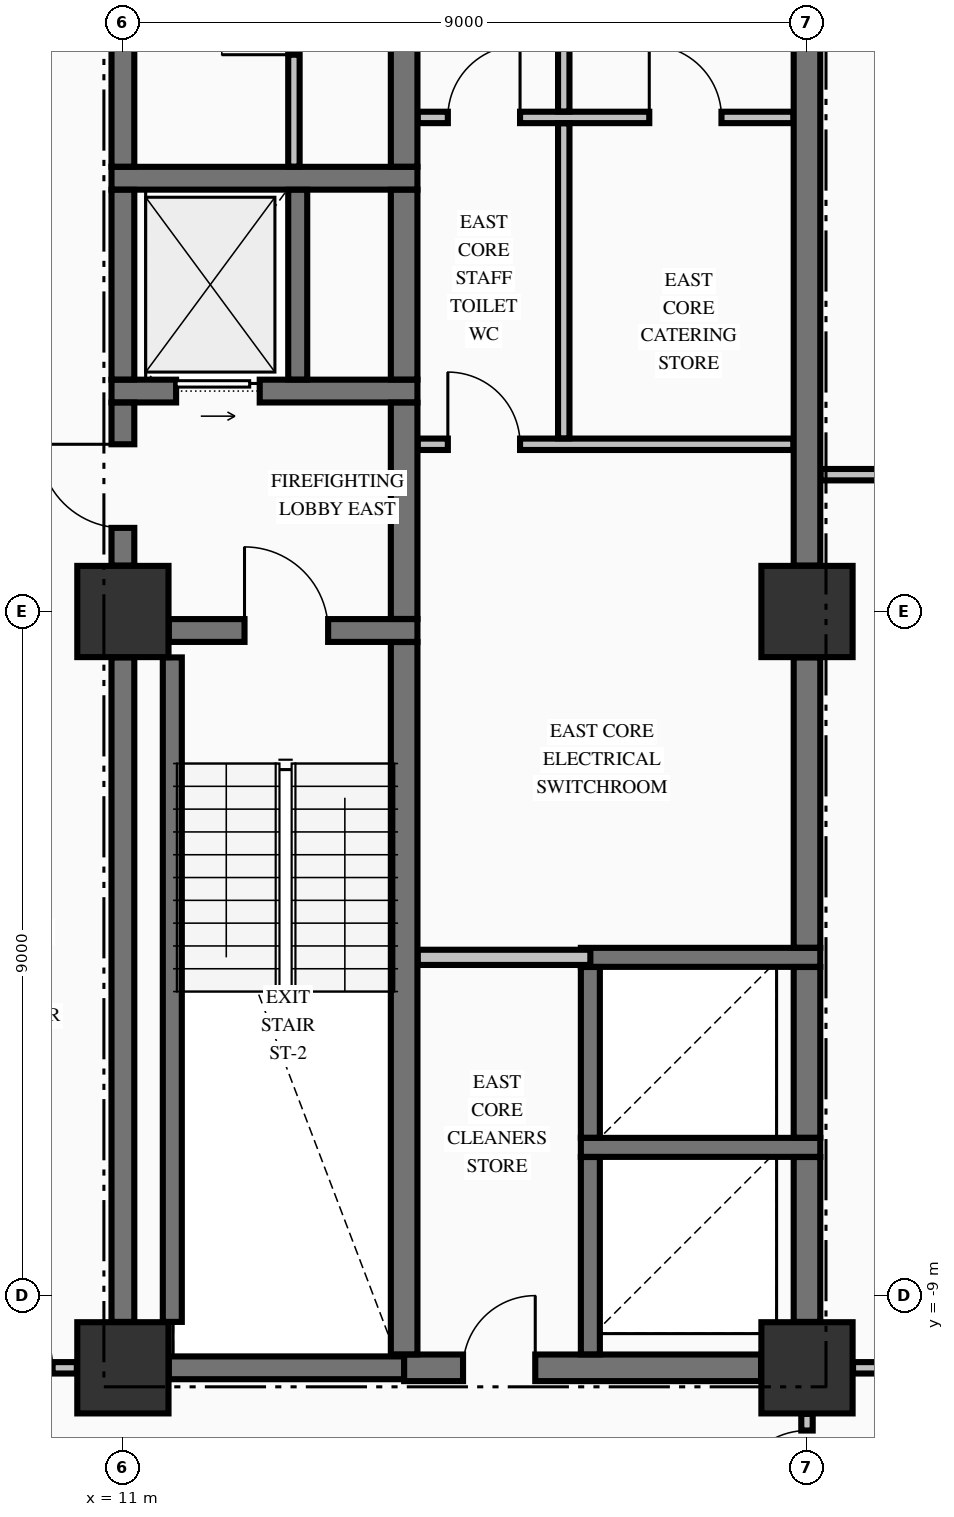
"""IFC4 building model, lengths in metres.
Left out: names, types, materials, properties, quantities, classifications, styles, units other than length and angle.
Written with IfcOpenShell. Run it as: python <this file> out.ifc"""

import sys

from ifc_helpers import new_model, si_unit, direction, frame, frame_2d, origin, origin_2d, place, context, subcontext, project, spatial, rectangle, extrude, element, fill, save


model = new_model("IFC4")
c1 = context("Model", 3, precision=1e-05, world=origin(), true_north=direction((0.0, 1.0)))
c2 = subcontext(c1, "Body", "Model", "MODEL_VIEW")
j1 = project(units=[si_unit("LENGTHUNIT", "METRE"), si_unit("PLANEANGLEUNIT", "RADIAN")], contexts=[c1])
p1 = place(None, origin())
s1 = spatial("IfcSite", under=j1, at=p1, CompositionType="ELEMENT")
p2 = place(p1, origin())
s2 = spatial("IfcBuilding", under=s1, at=p2, CompositionType="ELEMENT")
p3 = place(p2, frame((0.0, 0.0, 37.91)))
s3 = spatial("IfcBuildingStorey", under=s2, at=p3, CompositionType="ELEMENT", Elevation=37.91)
for number, where, z_axis, x_axis in (
    (1, (11.0, -9.95, -0.25), (0.0, 0.0, 1.0), (1.0, 0.0, 0.0)),
    (2, (11.0, 0.0, -0.25), (0.0, 0.0, 1.0), (1.0, 0.0, 0.0)),
    (3, (20.0, -9.95, -0.25), (0.0, 0.0, 1.0), (1.0, 0.0, 0.0)),
    (4, (20.0, 0.0, -0.25), (0.0, 0.0, 1.0), (1.0, 0.0, 0.0)),
):
    element("IfcColumn", number, at=place(p3, frame(where, z_axis=z_axis, x_axis=x_axis)), inside=s3, PredefinedType="COLUMN", context=c2, shape_type="SweptSolid", body=[
        extrude(rectangle(XDim=1.2, YDim=1.2, at=origin_2d()), origin(), (0.0, 0.0, 1.0), 3.57),
    ])
p4 = place(p3, frame((11.604, -9.95, 0.0), z_axis=(0.0, 0.0, 1.0), x_axis=(1.0, 0.0, 0.0)))
e5 = element("IfcWall", 5, at=p4, inside=s3, PredefinedType="SHEAR", context=c2, shape_type="SweptSolid", body=[
    extrude(rectangle(XDim=3.096, YDim=0.3, at=frame_2d((1.548, 0.0))), origin(), (0.0, 0.0, 1.0), 3.32),
])
p5 = place(p3, frame((14.7, -9.95, 0.0), z_axis=(0.0, 0.0, 1.0), x_axis=(1.0, 0.0, 0.0)))
e6 = element("IfcWall", 6, at=p5, inside=s3, PredefinedType="SHEAR", context=c2, shape_type="SweptSolid", body=[
    extrude(rectangle(XDim=4.696, YDim=0.35, at=frame_2d((2.348, 0.0))), origin(), (0.0, 0.0, 1.0), 3.32),
])
p6 = place(p5, frame((0.775, 0.0, 0.0)))
e7 = element("IfcOpeningElement", 7, at=p6, cuts=e6, PredefinedType="OPENING", context=c2, shape_type="SweptSolid", body=[
    extrude(rectangle(XDim=0.95, YDim=2.15, at=frame_2d((0.475, 1.075))), frame((0.0, 0.185, 0.0), z_axis=(0.0, -1.0, 0.0), x_axis=(1.0, 0.0, 0.0)), (0.0, 0.0, 1.0), 0.37),
])
for number, where, z_axis, x_axis in (
    (8, (17.025, -7.05, 0.0), (0.0, 0.0, 1.0), (1.0, 0.0, 0.0)),
    (9, (17.025, -4.55, 0.0), (0.0, 0.0, 1.0), (1.0, 0.0, 0.0)),
):
    element("IfcWall", number, at=place(p3, frame(where, z_axis=z_axis, x_axis=x_axis)), inside=s3, PredefinedType="SOLIDWALL", context=c2, shape_type="SweptSolid", body=[
        extrude(rectangle(XDim=3.15, YDim=0.25, at=frame_2d((1.575, 0.0))), origin(), (0.0, 0.0, 1.0), 3.32),
    ])
p7 = place(p3, frame((11.604, -0.25, 0.0), z_axis=(0.0, 0.0, 1.0), x_axis=(1.0, 0.0, 0.0)))
e10 = element("IfcWall", 10, at=p7, inside=s3, PredefinedType="SHEAR", context=c2, shape_type="SweptSolid", body=[
    extrude(rectangle(XDim=3.271, YDim=0.3, at=frame_2d((1.635, 0.0))), origin(), (0.0, 0.0, 1.0), 3.32),
])
p8 = place(p7, frame((0.996, 0.0, 0.0)))
e11 = element("IfcOpeningElement", 11, at=p8, cuts=e10, PredefinedType="OPENING", context=c2, shape_type="SweptSolid", body=[
    extrude(rectangle(XDim=1.1, YDim=2.15, at=frame_2d((0.55, 1.075))), frame((0.0, 0.16, 0.0), z_axis=(0.0, -1.0, 0.0), x_axis=(1.0, 0.0, 0.0)), (0.0, 0.0, 1.0), 0.32),
])
p9 = place(p3, frame((10.85, 2.9, 0.0), z_axis=(0.0, 0.0, 1.0), x_axis=(1.0, 0.0, 0.0)))
e12 = element("IfcWall", 12, at=p9, inside=s3, PredefinedType="SHEAR", context=c2, shape_type="SweptSolid", body=[
    extrude(rectangle(XDim=4.025, YDim=0.3, at=frame_2d((2.012, 0.0))), origin(), (0.0, 0.0, 1.0), 3.32),
])
p10 = place(p9, frame((0.85, 0.0, 0.0)))
e13 = element("IfcOpeningElement", 13, at=p10, cuts=e12, PredefinedType="OPENING", context=c2, shape_type="SweptSolid", body=[
    extrude(rectangle(XDim=1.1, YDim=2.2, at=frame_2d((0.55, 1.1))), frame((0.0, 0.16, 0.0), z_axis=(0.0, -1.0, 0.0), x_axis=(1.0, 0.0, 0.0)), (0.0, 0.0, 1.0), 0.32),
])
p11 = place(p3, frame((10.85, 5.7, 0.0), z_axis=(0.0, 0.0, 1.0), x_axis=(1.0, 0.0, 0.0)))
e14 = element("IfcWall", 14, at=p11, inside=s3, PredefinedType="SHEAR", context=c2, shape_type="SweptSolid", body=[
    extrude(rectangle(XDim=4.025, YDim=0.3, at=frame_2d((2.012, 0.0))), origin(), (0.0, 0.0, 1.0), 3.32),
])
p12 = place(p3, frame((-10.394, -9.95, 0.0), z_axis=(0.0, 0.0, 1.0), x_axis=(1.0, 0.0, 0.0)))
e15 = element("IfcWall", 15, at=p12, inside=s3, PredefinedType="PARTITIONING", context=c2, shape_type="SweptSolid", body=[
    extrude(rectangle(XDim=20.788, YDim=0.15, at=frame_2d((10.394, 0.0))), origin(), (0.0, 0.0, 1.0), 3.32),
])
p13 = place(p12, frame((0.319, 0.0, 0.0)))
e16 = element("IfcOpeningElement", 16, at=p13, cuts=e15, PredefinedType="OPENING", context=c2, shape_type="SweptSolid", body=[
    extrude(rectangle(XDim=1.05, YDim=2.15, at=frame_2d((0.525, 1.075))), frame((0.0, 0.085, 0.0), z_axis=(0.0, -1.0, 0.0), x_axis=(1.0, 0.0, 0.0)), (0.0, 0.0, 1.0), 0.17),
])
p14 = place(p12, frame((19.419, 0.0, 0.0)))
e17 = element("IfcOpeningElement", 17, at=p14, cuts=e15, PredefinedType="OPENING", context=c2, shape_type="SweptSolid", body=[
    extrude(rectangle(XDim=1.05, YDim=2.15, at=frame_2d((0.525, 1.075))), frame((0.0, 0.085, 0.0), z_axis=(0.0, -1.0, 0.0), x_axis=(1.0, 0.0, 0.0)), (0.0, 0.0, 1.0), 0.17),
])
p15 = place(p12, frame((11.569, 0.0, 0.0)))
e18 = element("IfcOpeningElement", 18, at=p15, cuts=e15, PredefinedType="OPENING", context=c2, shape_type="SweptSolid", body=[
    extrude(rectangle(XDim=0.95, YDim=2.15, at=frame_2d((0.475, 1.075))), frame((0.0, 0.085, 0.0), z_axis=(0.0, -1.0, 0.0), x_axis=(1.0, 0.0, 0.0)), (0.0, 0.0, 1.0), 0.17),
])
p16 = place(p3, frame((20.606, -9.95, 0.0), z_axis=(0.0, 0.0, 1.0), x_axis=(1.0, 0.0, 0.0)))
e19 = element("IfcWall", 19, at=p16, inside=s3, PredefinedType="PARTITIONING", context=c2, shape_type="SweptSolid", body=[
    extrude(rectangle(XDim=8.229, YDim=0.15, at=frame_2d((4.115, 0.0))), origin(), (0.0, 0.0, 1.0), 3.32),
])
p17 = place(p16, frame((3.419, 0.0, 0.0)))
e20 = element("IfcOpeningElement", 20, at=p17, cuts=e19, PredefinedType="OPENING", context=c2, shape_type="SweptSolid", body=[
    extrude(rectangle(XDim=0.95, YDim=2.15, at=frame_2d((0.475, 1.075))), frame((0.0, 0.085, 0.0), z_axis=(0.0, -1.0, 0.0), x_axis=(1.0, 0.0, 0.0)), (0.0, 0.0, 1.0), 0.17),
])
p18 = place(p3, frame((14.878, -4.55, 0.0), z_axis=(0.0, 0.0, 1.0), x_axis=(1.0, 0.0, 0.0)))
e21 = element("IfcWall", 21, at=p18, inside=s3, PredefinedType="PARTITIONING", context=c2, shape_type="SweptSolid", body=[
    extrude(rectangle(XDim=2.272, YDim=0.2, at=frame_2d((1.136, 0.0))), origin(), (0.0, 0.0, 1.0), 3.32),
])
p19 = place(p3, frame((20.178, 1.8, 0.0), z_axis=(0.0, 0.0, 1.0), x_axis=(1.0, 0.0, 0.0)))
e22 = element("IfcWall", 22, at=p19, inside=s3, PredefinedType="PARTITIONING", context=c2, shape_type="SweptSolid", body=[
    extrude(rectangle(XDim=8.657, YDim=0.15, at=frame_2d((4.329, 0.0))), origin(), (0.0, 0.0, 1.0), 3.32),
])
p20 = place(p3, frame((14.878, 2.2, 0.0), z_axis=(0.0, 0.0, 1.0), x_axis=(1.0, 0.0, 0.0)))
e23 = element("IfcWall", 23, at=p20, inside=s3, PredefinedType="PARTITIONING", context=c2, shape_type="SweptSolid", body=[
    extrude(rectangle(XDim=4.944, YDim=0.15, at=frame_2d((2.472, 0.0))), origin(), (0.0, 0.0, 1.0), 3.32),
])
p21 = place(p20, frame((0.397, 0.0, 0.0)))
e24 = element("IfcOpeningElement", 24, at=p21, cuts=e23, PredefinedType="OPENING", context=c2, shape_type="SweptSolid", body=[
    extrude(rectangle(XDim=0.95, YDim=2.15, at=frame_2d((0.475, 1.075))), frame((0.0, 0.085, 0.0), z_axis=(0.0, -1.0, 0.0), x_axis=(1.0, 0.0, 0.0)), (0.0, 0.0, 1.0), 0.17),
])
p22 = place(p3, frame((14.878, 6.5, 0.0), z_axis=(0.0, 0.0, 1.0), x_axis=(1.0, 0.0, 0.0)))
e25 = element("IfcWall", 25, at=p22, inside=s3, PredefinedType="PARTITIONING", context=c2, shape_type="SweptSolid", body=[
    extrude(rectangle(XDim=4.944, YDim=0.15, at=frame_2d((2.472, 0.0))), origin(), (0.0, 0.0, 1.0), 3.32),
])
p23 = place(p22, frame((0.397, 0.0, 0.0)))
e26 = element("IfcOpeningElement", 26, at=p23, cuts=e25, PredefinedType="OPENING", context=c2, shape_type="SweptSolid", body=[
    extrude(rectangle(XDim=0.95, YDim=2.15, at=frame_2d((0.475, 1.075))), frame((0.0, 0.085, 0.0), z_axis=(0.0, -1.0, 0.0), x_axis=(1.0, 0.0, 0.0)), (0.0, 0.0, 1.0), 0.17),
])
p24 = place(p22, frame((3.047, 0.0, 0.0)))
e27 = element("IfcOpeningElement", 27, at=p24, cuts=e25, PredefinedType="OPENING", context=c2, shape_type="SweptSolid", body=[
    extrude(rectangle(XDim=0.95, YDim=2.15, at=frame_2d((0.475, 1.075))), frame((0.0, 0.085, 0.0), z_axis=(0.0, -1.0, 0.0), x_axis=(1.0, 0.0, 0.0)), (0.0, 0.0, 1.0), 0.17),
])
p25 = place(p3, frame((11.0, -9.346, 0.0), z_axis=(0.0, 0.0, 1.0), x_axis=(0.0, 1.0, 0.0)))
e28 = element("IfcWall", 28, at=p25, inside=s3, PredefinedType="SHEAR", context=c2, shape_type="SweptSolid", body=[
    extrude(rectangle(XDim=8.742, YDim=0.3, at=frame_2d((4.371, 0.0))), origin(), (0.0, 0.0, 1.0), 3.32),
])
p26 = place(p3, frame((11.0, 0.604, 0.0), z_axis=(0.0, 0.0, 1.0), x_axis=(0.0, 1.0, 0.0)))
e29 = element("IfcWall", 29, at=p26, inside=s3, PredefinedType="SHEAR", context=c2, shape_type="SweptSolid", body=[
    extrude(rectangle(XDim=2.144, YDim=0.3, at=frame_2d((1.072, 0.0))), origin(), (0.0, 0.0, 1.0), 3.32),
])
p27 = place(p26, frame((0.496, 0.0, 0.0)))
e30 = element("IfcOpeningElement", 30, at=p27, cuts=e29, PredefinedType="OPENING", context=c2, shape_type="SweptSolid", body=[
    extrude(rectangle(XDim=1.1, YDim=2.15, at=frame_2d((0.55, 1.075))), frame((0.0, 0.16, 0.0), z_axis=(0.0, -1.0, 0.0), x_axis=(1.0, 0.0, 0.0)), (0.0, 0.0, 1.0), 0.32),
])
p28 = place(p3, frame((11.0, 3.052, 0.0), z_axis=(0.0, 0.0, 1.0), x_axis=(0.0, 1.0, 0.0)))
e31 = element("IfcWall", 31, at=p28, inside=s3, PredefinedType="SHEAR", context=c2, shape_type="SweptSolid", body=[
    extrude(rectangle(XDim=2.496, YDim=0.3, at=frame_2d((1.248, 0.0))), origin(), (0.0, 0.0, 1.0), 3.32),
])
p29 = place(p3, frame((11.0, 5.852, 0.0), z_axis=(0.0, 0.0, 1.0), x_axis=(0.0, 1.0, 0.0)))
e32 = element("IfcWall", 32, at=p29, inside=s3, PredefinedType="SHEAR", context=c2, shape_type="SweptSolid", body=[
    extrude(rectangle(XDim=4.044, YDim=0.3, at=frame_2d((2.022, 0.0))), origin(), (0.0, 0.0, 1.0), 3.32),
])
p30 = place(p3, frame((11.65, -9.346, 0.0), z_axis=(0.0, 0.0, 1.0), x_axis=(0.0, 1.0, 0.0)))
e33 = element("IfcWall", 33, at=p30, inside=s3, PredefinedType="SOLIDWALL", context=c2, shape_type="SweptSolid", body=[
    extrude(rectangle(XDim=8.742, YDim=0.25, at=frame_2d((4.371, 0.0))), origin(), (0.0, 0.0, 1.0), 3.32),
])
p31 = place(p3, frame((13.3, 3.052, 0.0), z_axis=(0.0, 0.0, 1.0), x_axis=(0.0, 1.0, 0.0)))
e34 = element("IfcWall", 34, at=p31, inside=s3, PredefinedType="SOLIDWALL", context=c2, shape_type="SweptSolid", body=[
    extrude(rectangle(XDim=2.496, YDim=0.25, at=frame_2d((1.248, 0.0))), origin(), (0.0, 0.0, 1.0), 3.32),
])
p32 = place(p3, frame((14.7, -9.773, 0.0), z_axis=(0.0, 0.0, 1.0), x_axis=(0.0, 1.0, 0.0)))
e35 = element("IfcWall", 35, at=p32, inside=s3, PredefinedType="SHEAR", context=c2, shape_type="SweptSolid", body=[
    extrude(rectangle(XDim=9.371, YDim=0.35, at=frame_2d((4.686, 0.0))), origin(), (0.0, 0.0, 1.0), 3.32),
])
p33 = place(p3, frame((14.7, -0.098, 0.0), z_axis=(0.0, 0.0, 1.0), x_axis=(0.0, 1.0, 0.0)))
e36 = element("IfcWall", 36, at=p33, inside=s3, PredefinedType="SHEAR", context=c2, shape_type="SweptSolid", body=[
    extrude(rectangle(XDim=2.846, YDim=0.35, at=frame_2d((1.423, 0.0))), origin(), (0.0, 0.0, 1.0), 3.32),
])
p34 = place(p3, frame((14.7, 3.052, 0.0), z_axis=(0.0, 0.0, 1.0), x_axis=(0.0, 1.0, 0.0)))
e37 = element("IfcWall", 37, at=p34, inside=s3, PredefinedType="SHEAR", context=c2, shape_type="SweptSolid", body=[
    extrude(rectangle(XDim=2.496, YDim=0.35, at=frame_2d((1.248, 0.0))), origin(), (0.0, 0.0, 1.0), 3.32),
])
p35 = place(p3, frame((14.7, 5.852, 0.0), z_axis=(0.0, 0.0, 1.0), x_axis=(0.0, 1.0, 0.0)))
e38 = element("IfcWall", 38, at=p35, inside=s3, PredefinedType="SHEAR", context=c2, shape_type="SweptSolid", body=[
    extrude(rectangle(XDim=4.471, YDim=0.35, at=frame_2d((2.235, 0.0))), origin(), (0.0, 0.0, 1.0), 3.32),
])
p36 = place(p3, frame((17.15, -9.773, 0.0), z_axis=(0.0, 0.0, 1.0), x_axis=(0.0, 1.0, 0.0)))
e39 = element("IfcWall", 39, at=p36, inside=s3, PredefinedType="SOLIDWALL", context=c2, shape_type="SweptSolid", body=[
    extrude(rectangle(XDim=2.596, YDim=0.25, at=frame_2d((1.298, 0.0))), origin(), (0.0, 0.0, 1.0), 3.32),
])
p37 = place(p3, frame((17.15, -6.923, 0.0), z_axis=(0.0, 0.0, 1.0), x_axis=(0.0, 1.0, 0.0)))
e40 = element("IfcWall", 40, at=p37, inside=s3, PredefinedType="SOLIDWALL", context=c2, shape_type="SweptSolid", body=[
    extrude(rectangle(XDim=2.246, YDim=0.25, at=frame_2d((1.123, 0.0))), origin(), (0.0, 0.0, 1.0), 3.32),
])
p38 = place(p3, frame((20.0, -9.346, 0.0), z_axis=(0.0, 0.0, 1.0), x_axis=(0.0, 1.0, 0.0)))
e41 = element("IfcWall", 41, at=p38, inside=s3, PredefinedType="SHEAR", context=c2, shape_type="SweptSolid", body=[
    extrude(rectangle(XDim=2.169, YDim=0.35, at=frame_2d((1.084, 0.0))), origin(), (0.0, 0.0, 1.0), 3.32),
])
p39 = place(p3, frame((20.0, -6.923, 0.0), z_axis=(0.0, 0.0, 1.0), x_axis=(0.0, 1.0, 0.0)))
e42 = element("IfcWall", 42, at=p39, inside=s3, PredefinedType="SHEAR", context=c2, shape_type="SweptSolid", body=[
    extrude(rectangle(XDim=2.246, YDim=0.35, at=frame_2d((1.123, 0.0))), origin(), (0.0, 0.0, 1.0), 3.32),
])
p40 = place(p3, frame((20.0, -4.423, 0.0), z_axis=(0.0, 0.0, 1.0), x_axis=(0.0, 1.0, 0.0)))
e43 = element("IfcWall", 43, at=p40, inside=s3, PredefinedType="SHEAR", context=c2, shape_type="SweptSolid", body=[
    extrude(rectangle(XDim=3.819, YDim=0.35, at=frame_2d((1.91, 0.0))), origin(), (0.0, 0.0, 1.0), 3.32),
])
p41 = place(p3, frame((20.0, 0.604, 0.0), z_axis=(0.0, 0.0, 1.0), x_axis=(0.0, 1.0, 0.0)))
e44 = element("IfcWall", 44, at=p41, inside=s3, PredefinedType="SHEAR", context=c2, shape_type="SweptSolid", body=[
    extrude(rectangle(XDim=9.292, YDim=0.35, at=frame_2d((4.646, 0.0))), origin(), (0.0, 0.0, 1.0), 3.32),
])
p42 = place(p3, frame((13.25, 5.853, 0.0), z_axis=(0.0, 0.0, 1.0), x_axis=(0.0, 1.0, 0.0)))
e45 = element("IfcWall", 45, at=p42, inside=s3, PredefinedType="PARTITIONING", context=c2, shape_type="SweptSolid", body=[
    extrude(rectangle(XDim=4.494, YDim=0.15, at=frame_2d((2.247, 0.0))), origin(), (0.0, 0.0, 1.0), 3.32),
])
p43 = place(p42, frame((1.472, 0.0, 0.0)))
e46 = element("IfcOpeningElement", 46, at=p43, cuts=e45, PredefinedType="OPENING", context=c2, shape_type="SweptSolid", body=[
    extrude(rectangle(XDim=0.95, YDim=2.15, at=frame_2d((0.475, 1.075))), frame((0.0, 0.085, 0.0), z_axis=(0.0, -1.0, 0.0), x_axis=(1.0, 0.0, 0.0)), (0.0, 0.0, 1.0), 0.17),
])
p44 = place(p3, frame((16.8, 2.278, 0.0), z_axis=(0.0, 0.0, 1.0), x_axis=(0.0, 1.0, 0.0)))
e47 = element("IfcWall", 47, at=p44, inside=s3, PredefinedType="PARTITIONING", context=c2, shape_type="SweptSolid", body=[
    extrude(rectangle(XDim=4.144, YDim=0.15, at=frame_2d((2.072, 0.0))), origin(), (0.0, 0.0, 1.0), 3.32),
])
p45 = place(p3, frame((16.8, 6.578, 0.0), z_axis=(0.0, 0.0, 1.0), x_axis=(0.0, 1.0, 0.0)))
e48 = element("IfcWall", 48, at=p45, inside=s3, PredefinedType="PARTITIONING", context=c2, shape_type="SweptSolid", body=[
    extrude(rectangle(XDim=3.744, YDim=0.15, at=frame_2d((1.872, 0.0))), origin(), (0.0, 0.0, 1.0), 3.32),
])
p46 = place(p45, frame((1.447, 0.0, 0.0)))
e49 = element("IfcOpeningElement", 49, at=p46, cuts=e48, PredefinedType="OPENING", context=c2, shape_type="SweptSolid", body=[
    extrude(rectangle(XDim=0.95, YDim=2.15, at=frame_2d((0.475, 1.075))), frame((0.0, 0.085, 0.0), z_axis=(0.0, -1.0, 0.0), x_axis=(1.0, 0.0, 0.0)), (0.0, 0.0, 1.0), 0.17),
])
p47 = place(p3, frame((20.0, -12.472, 0.0), z_axis=(0.0, 0.0, 1.0), x_axis=(0.0, 1.0, 0.0)))
e50 = element("IfcWall", 50, at=p47, inside=s3, PredefinedType="PARTITIONING", context=c2, shape_type="SweptSolid", body=[
    extrude(rectangle(XDim=1.916, YDim=0.15, at=frame_2d((0.958, 0.0))), origin(), (0.0, 0.0, 1.0), 2.66),
])
p48 = place(p47, frame((0.747, 0.0, 0.0)))
e51 = element("IfcOpeningElement", 51, at=p48, cuts=e50, PredefinedType="OPENING", context=c2, shape_type="SweptSolid", body=[
    extrude(rectangle(XDim=0.95, YDim=2.15, at=frame_2d((0.475, 1.075))), frame((0.0, 0.085, 0.0), z_axis=(0.0, -1.0, 0.0), x_axis=(1.0, 0.0, 0.0)), (0.0, 0.0, 1.0), 0.17),
])
p49 = place(p8, origin())
e52 = element("IfcDoor", 52, at=p49, inside=s3, OperationType="SINGLE_SWING_LEFT", PredefinedType="DOOR", context=c2, shape_type="SweptSolid", body=[
    extrude(rectangle(XDim=1.1, YDim=2.15, at=frame_2d((0.55, 1.075))), frame((0.0, 0.025, 0.0), z_axis=(0.0, -1.0, 0.0), x_axis=(1.0, 0.0, 0.0)), (0.0, 0.0, 1.0), 0.05),
])
fill(e11, e52)
p50 = place(p27, origin())
e53 = element("IfcDoor", 53, at=p50, inside=s3, OperationType="SINGLE_SWING_RIGHT", PredefinedType="DOOR", context=c2, shape_type="SweptSolid", body=[
    extrude(rectangle(XDim=1.1, YDim=2.15, at=frame_2d((0.55, 1.075))), frame((0.0, 0.025, 0.0), z_axis=(0.0, -1.0, 0.0), x_axis=(1.0, 0.0, 0.0)), (0.0, 0.0, 1.0), 0.05),
])
fill(e30, e53)
p51 = place(p10, origin())
e54 = element("IfcDoor", 54, at=p51, inside=s3, OperationType="SLIDING_TO_RIGHT", PredefinedType="DOOR", context=c2, shape_type="SweptSolid", body=[
    extrude(rectangle(XDim=1.1, YDim=2.2, at=frame_2d((0.55, 1.1))), frame((0.0, 0.025, 0.0), z_axis=(0.0, -1.0, 0.0), x_axis=(1.0, 0.0, 0.0)), (0.0, 0.0, 1.0), 0.05),
])
fill(e13, e54)
p52 = place(p43, origin())
e55 = element("IfcDoor", 55, at=p52, inside=s3, OperationType="SINGLE_SWING_LEFT", PredefinedType="DOOR", context=c2, shape_type="SweptSolid", body=[
    extrude(rectangle(XDim=0.95, YDim=2.15, at=frame_2d((0.475, 1.075))), frame((0.0, 0.025, 0.0), z_axis=(0.0, -1.0, 0.0), x_axis=(1.0, 0.0, 0.0)), (0.0, 0.0, 1.0), 0.05),
])
fill(e46, e55)
p53 = place(p6, origin())
e56 = element("IfcDoor", 56, at=p53, inside=s3, OperationType="SINGLE_SWING_RIGHT", PredefinedType="DOOR", context=c2, shape_type="SweptSolid", body=[
    extrude(rectangle(XDim=0.95, YDim=2.15, at=frame_2d((0.475, 1.075))), frame((0.0, 0.025, 0.0), z_axis=(0.0, -1.0, 0.0), x_axis=(1.0, 0.0, 0.0)), (0.0, 0.0, 1.0), 0.05),
])
fill(e7, e56)
p54 = place(p23, origin())
e57 = element("IfcDoor", 57, at=p54, inside=s3, OperationType="SINGLE_SWING_RIGHT", PredefinedType="DOOR", context=c2, shape_type="SweptSolid", body=[
    extrude(rectangle(XDim=0.95, YDim=2.15, at=frame_2d((0.475, 1.075))), frame((0.0, 0.025, 0.0), z_axis=(0.0, -1.0, 0.0), x_axis=(1.0, 0.0, 0.0)), (0.0, 0.0, 1.0), 0.05),
])
fill(e26, e57)
p55 = place(p21, origin())
e58 = element("IfcDoor", 58, at=p55, inside=s3, OperationType="SINGLE_SWING_LEFT", PredefinedType="DOOR", context=c2, shape_type="SweptSolid", body=[
    extrude(rectangle(XDim=0.95, YDim=2.15, at=frame_2d((0.475, 1.075))), frame((0.0, 0.025, 0.0), z_axis=(0.0, -1.0, 0.0), x_axis=(1.0, 0.0, 0.0)), (0.0, 0.0, 1.0), 0.05),
])
fill(e24, e58)
p56 = place(p24, origin())
e59 = element("IfcDoor", 59, at=p56, inside=s3, OperationType="SINGLE_SWING_LEFT", PredefinedType="DOOR", context=c2, shape_type="SweptSolid", body=[
    extrude(rectangle(XDim=0.95, YDim=2.15, at=frame_2d((0.475, 1.075))), frame((0.0, 0.025, 0.0), z_axis=(0.0, -1.0, 0.0), x_axis=(1.0, 0.0, 0.0)), (0.0, 0.0, 1.0), 0.05),
])
fill(e27, e59)
p57 = place(p48, origin())
e60 = element("IfcDoor", 60, at=p57, inside=s3, OperationType="SINGLE_SWING_LEFT", PredefinedType="DOOR", context=c2, shape_type="SweptSolid", body=[
    extrude(rectangle(XDim=0.95, YDim=2.15, at=frame_2d((0.475, 1.075))), frame((0.0, 0.025, 0.0), z_axis=(0.0, -1.0, 0.0), x_axis=(1.0, 0.0, 0.0)), (0.0, 0.0, 1.0), 0.05),
])
fill(e51, e60)
save(model, sys.argv[1])
